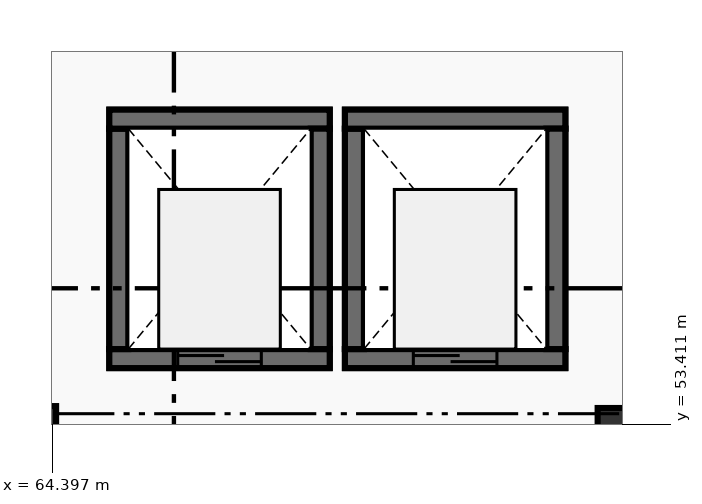
"""IFC4 building model, lengths in metres.
Left out: names, types, materials, properties, quantities, classifications, styles, units other than length and angle.
Written with IfcOpenShell. Run it as: python <this file> out.ifc"""

import sys

from ifc_helpers import new_model, si_unit, direction, frame, frame_2d, origin, origin_2d, place, context, subcontext, project, spatial, rectangle, extrude, element, fill, save


model = new_model("IFC4")
c1 = context("Model", 3, precision=1e-05, world=origin(), true_north=direction((0.0, 1.0)))
c2 = subcontext(c1, "Body", "Model", "MODEL_VIEW")
j1 = project(units=[si_unit("LENGTHUNIT", "METRE"), si_unit("PLANEANGLEUNIT", "RADIAN")], contexts=[c1])
p1 = place(None, origin())
s1 = spatial("IfcSite", under=j1, at=p1, CompositionType="ELEMENT")
p2 = place(p1, origin())
s2 = spatial("IfcBuilding", under=s1, at=p2, CompositionType="ELEMENT")
p3 = place(p2, frame((0.0, 0.0, -4.5)))
s3 = spatial("IfcBuildingStorey", under=s2, at=p3, CompositionType="ELEMENT", Elevation=-4.5)
p4 = place(p3, frame((64.0, 53.2, 0.0), z_axis=(0.0, 0.0, 1.0), x_axis=(1.0, 0.0, 0.0)))
e1 = element("IfcColumn", 1, at=p4, inside=s3, PredefinedType="COLUMN", context=c2, shape_type="SweptSolid", body=[
    extrude(rectangle(XDim=0.9, YDim=0.9, at=origin_2d()), origin(), (0.0, 0.0, 1.0), 4.5),
])
p5 = place(p3, frame((72.0, 53.2, 0.0), z_axis=(0.0, 0.0, 1.0), x_axis=(1.0, 0.0, 0.0)))
e2 = element("IfcColumn", 2, at=p5, inside=s3, PredefinedType="COLUMN", context=c2, shape_type="SweptSolid", body=[
    extrude(rectangle(XDim=0.85, YDim=0.85, at=origin_2d()), origin(), (0.0, 0.0, 1.0), 4.5),
])
for number, where, z_axis, x_axis in (
    (3, (68.05, 54.275, -1.35), (0.0, 0.0, 1.0), (-1.0, 0.0, 0.0)),
    (4, (65.275, 54.4, -1.35), (0.0, 0.0, 1.0), (0.0, 1.0, 0.0)),
    (5, (65.15, 57.425, -1.35), (0.0, 0.0, 1.0), (1.0, 0.0, 0.0)),
    (6, (67.925, 57.3, -1.35), (0.0, 0.0, 1.0), (0.0, -1.0, 0.0)),
):
    element("IfcWall", number, at=place(p3, frame(where, z_axis=z_axis, x_axis=x_axis)), inside=s3, PredefinedType="SHEAR", context=c2, shape_type="SweptSolid", body=[
        extrude(rectangle(XDim=2.9, YDim=0.25, at=frame_2d((1.45, 0.0))), origin(), (0.0, 0.0, 1.0), 1.35),
    ])
p6 = place(p3, frame((68.05, 54.275, 0.0), z_axis=(0.0, 0.0, 1.0), x_axis=(-1.0, 0.0, 0.0)))
e7 = element("IfcWall", 7, at=p6, inside=s3, PredefinedType="SHEAR", context=c2, shape_type="SweptSolid", body=[
    extrude(rectangle(XDim=2.9, YDim=0.25, at=frame_2d((1.45, 0.0))), origin(), (0.0, 0.0, 1.0), 4.5),
])
p7 = place(p6, frame((0.9, 0.0, 0.0)))
e8 = element("IfcOpeningElement", 8, at=p7, cuts=e7, PredefinedType="OPENING", context=c2, shape_type="SweptSolid", body=[
    extrude(rectangle(XDim=1.1, YDim=2.15, at=frame_2d((0.55, 1.075))), frame((0.0, 0.135, 0.0), z_axis=(0.0, -1.0, 0.0), x_axis=(1.0, 0.0, 0.0)), (0.0, 0.0, 1.0), 0.27),
])
for number, where, z_axis, x_axis in (
    (9, (65.275, 54.4, 0.0), (0.0, 0.0, 1.0), (0.0, 1.0, 0.0)),
    (10, (65.15, 57.425, 0.0), (0.0, 0.0, 1.0), (1.0, 0.0, 0.0)),
    (11, (67.925, 57.3, 0.0), (0.0, 0.0, 1.0), (0.0, -1.0, 0.0)),
):
    element("IfcWall", number, at=place(p3, frame(where, z_axis=z_axis, x_axis=x_axis)), inside=s3, PredefinedType="SHEAR", context=c2, shape_type="SweptSolid", body=[
        extrude(rectangle(XDim=2.9, YDim=0.25, at=frame_2d((1.45, 0.0))), origin(), (0.0, 0.0, 1.0), 4.5),
    ])
p8 = place(p3, frame((71.15, 54.275, -1.35), z_axis=(0.0, 0.0, 1.0), x_axis=(-1.0, 0.0, 0.0)))
e12 = element("IfcWall", 12, at=p8, inside=s3, PredefinedType="SHEAR", context=c2, shape_type="SweptSolid", body=[
    extrude(rectangle(XDim=2.9, YDim=0.25, at=frame_2d((1.45, 0.0))), origin(), (0.0, 0.0, 1.0), 1.35),
])
p9 = place(p3, frame((68.375, 54.4, -1.35), z_axis=(0.0, 0.0, 1.0), x_axis=(0.0, 1.0, 0.0)))
e13 = element("IfcWall", 13, at=p9, inside=s3, PredefinedType="SHEAR", context=c2, shape_type="SweptSolid", body=[
    extrude(rectangle(XDim=2.9, YDim=0.25, at=frame_2d((1.45, 0.0))), origin(), (0.0, 0.0, 1.0), 1.35),
])
p10 = place(p3, frame((68.25, 57.425, -1.35), z_axis=(0.0, 0.0, 1.0), x_axis=(1.0, 0.0, 0.0)))
e14 = element("IfcWall", 14, at=p10, inside=s3, PredefinedType="SHEAR", context=c2, shape_type="SweptSolid", body=[
    extrude(rectangle(XDim=2.9, YDim=0.25, at=frame_2d((1.45, 0.0))), origin(), (0.0, 0.0, 1.0), 1.35),
])
p11 = place(p3, frame((71.025, 57.3, -1.35), z_axis=(0.0, 0.0, 1.0), x_axis=(0.0, -1.0, 0.0)))
e15 = element("IfcWall", 15, at=p11, inside=s3, PredefinedType="SHEAR", context=c2, shape_type="SweptSolid", body=[
    extrude(rectangle(XDim=2.9, YDim=0.25, at=frame_2d((1.45, 0.0))), origin(), (0.0, 0.0, 1.0), 1.35),
])
p12 = place(p3, frame((71.15, 54.275, 0.0), z_axis=(0.0, 0.0, 1.0), x_axis=(-1.0, 0.0, 0.0)))
e16 = element("IfcWall", 16, at=p12, inside=s3, PredefinedType="SHEAR", context=c2, shape_type="SweptSolid", body=[
    extrude(rectangle(XDim=2.9, YDim=0.25, at=frame_2d((1.45, 0.0))), origin(), (0.0, 0.0, 1.0), 4.5),
])
p13 = place(p12, frame((0.9, 0.0, 0.0)))
e17 = element("IfcOpeningElement", 17, at=p13, cuts=e16, PredefinedType="OPENING", context=c2, shape_type="SweptSolid", body=[
    extrude(rectangle(XDim=1.1, YDim=2.15, at=frame_2d((0.55, 1.075))), frame((0.0, 0.135, 0.0), z_axis=(0.0, -1.0, 0.0), x_axis=(1.0, 0.0, 0.0)), (0.0, 0.0, 1.0), 0.27),
])
p14 = place(p3, frame((68.375, 54.4, 0.0), z_axis=(0.0, 0.0, 1.0), x_axis=(0.0, 1.0, 0.0)))
e18 = element("IfcWall", 18, at=p14, inside=s3, PredefinedType="SHEAR", context=c2, shape_type="SweptSolid", body=[
    extrude(rectangle(XDim=2.9, YDim=0.25, at=frame_2d((1.45, 0.0))), origin(), (0.0, 0.0, 1.0), 4.5),
])
p15 = place(p3, frame((68.25, 57.425, 0.0), z_axis=(0.0, 0.0, 1.0), x_axis=(1.0, 0.0, 0.0)))
e19 = element("IfcWall", 19, at=p15, inside=s3, PredefinedType="SHEAR", context=c2, shape_type="SweptSolid", body=[
    extrude(rectangle(XDim=2.9, YDim=0.25, at=frame_2d((1.45, 0.0))), origin(), (0.0, 0.0, 1.0), 4.5),
])
p16 = place(p3, frame((71.025, 57.3, 0.0), z_axis=(0.0, 0.0, 1.0), x_axis=(0.0, -1.0, 0.0)))
e20 = element("IfcWall", 20, at=p16, inside=s3, PredefinedType="SHEAR", context=c2, shape_type="SweptSolid", body=[
    extrude(rectangle(XDim=2.9, YDim=0.25, at=frame_2d((1.45, 0.0))), origin(), (0.0, 0.0, 1.0), 4.5),
])
p17 = place(p7, origin())
e21 = element("IfcDoor", 21, at=p17, inside=s3, OperationType="DOUBLE_DOOR_SLIDING", PredefinedType="DOOR", context=c2, shape_type="SweptSolid", body=[
    extrude(rectangle(XDim=1.1, YDim=2.15, at=frame_2d((0.55, 1.075))), frame((0.0, 0.025, 0.0), z_axis=(0.0, -1.0, 0.0), x_axis=(1.0, 0.0, 0.0)), (0.0, 0.0, 1.0), 0.05),
])
fill(e8, e21)
p18 = place(p13, origin())
e22 = element("IfcDoor", 22, at=p18, inside=s3, OperationType="DOUBLE_DOOR_SLIDING", PredefinedType="DOOR", context=c2, shape_type="SweptSolid", body=[
    extrude(rectangle(XDim=1.1, YDim=2.15, at=frame_2d((0.55, 1.075))), frame((0.0, 0.025, 0.0), z_axis=(0.0, -1.0, 0.0), x_axis=(1.0, 0.0, 0.0)), (0.0, 0.0, 1.0), 0.05),
])
fill(e17, e22)
save(model, sys.argv[1])
